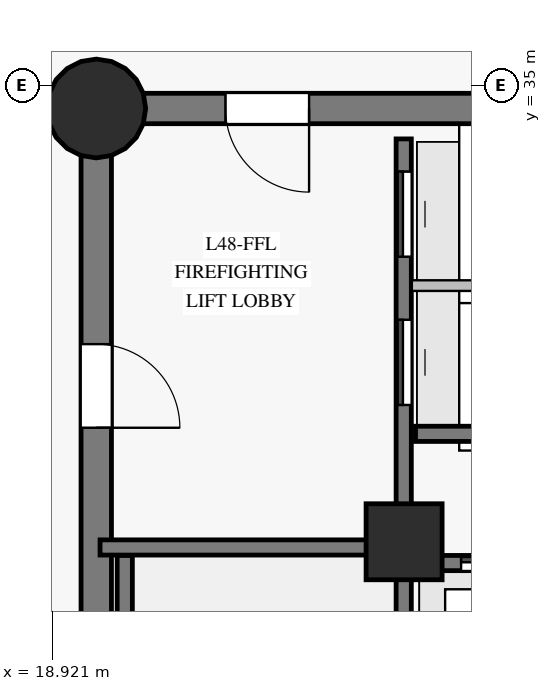
"""IFC4 building model, lengths in metres.
Left out: names, types, materials, properties, quantities, classifications, styles, units other than length and angle.
Written with IfcOpenShell. Run it as: python <this file> out.ifc"""

import sys

from ifc_helpers import new_model, si_unit, direction, frame, frame_2d, origin, origin_with_axes, origin_2d, place, context, subcontext, project, spatial, rectangle, circle, extrude, source, transform, mapped, element, fill, save


model = new_model("IFC4")
c1 = context("Model", 3, precision=1e-05, world=origin(), true_north=direction((0.0, 1.0)))
c2 = subcontext(c1, "Body", "Model", "MODEL_VIEW")
j1 = project(units=[si_unit("LENGTHUNIT", "METRE"), si_unit("PLANEANGLEUNIT", "RADIAN")], contexts=[c1])
p1 = place(None, origin())
s1 = spatial("IfcSite", under=j1, at=p1, CompositionType="ELEMENT")
p2 = place(p1, origin())
s2 = spatial("IfcBuilding", under=s1, at=p2, CompositionType="ELEMENT")
p3 = place(p2, frame((0.0, 0.0, 168.75)))
s3 = spatial("IfcBuildingStorey", under=s2, at=p3, CompositionType="ELEMENT", Elevation=168.75)
p4 = place(p3, frame((26.55, 34.7, 0.0), z_axis=(0.0, 0.0, 1.0), x_axis=(-1.0, 0.0, 0.0)))
e1 = element("IfcWall", 1, at=p4, inside=s3, PredefinedType="SHEAR", context=c2, shape_type="SweptSolid", body=[
    extrude(rectangle(XDim=7.05, YDim=0.4, at=frame_2d((3.525, 0.0))), origin(), (0.0, 0.0, 1.0), 2.825),
])
p5 = place(p4, frame((4.25, 0.0, 0.0)))
e2 = element("IfcOpeningElement", 2, at=p5, cuts=e1, PredefinedType="OPENING", context=c2, shape_type="SweptSolid", body=[
    extrude(rectangle(XDim=1.1, YDim=2.15, at=frame_2d((0.55, 1.075))), frame((0.0, 0.21, 0.0), z_axis=(0.0, -1.0, 0.0), x_axis=(1.0, 0.0, 0.0)), (0.0, 0.0, 1.0), 0.42),
])
p6 = place(p3, frame((19.5, 34.7, 0.0), z_axis=(0.0, 0.0, 1.0), x_axis=(0.0, -1.0, 0.0)))
e3 = element("IfcWall", 3, at=p6, inside=s3, PredefinedType="SHEAR", context=c2, shape_type="SweptSolid", body=[
    extrude(rectangle(XDim=16.4, YDim=0.4, at=frame_2d((8.2, 0.0))), origin(), (0.0, 0.0, 1.0), 2.825),
])
p7 = place(p6, frame((3.1, 0.0, 0.0)))
e4 = element("IfcOpeningElement", 4, at=p7, cuts=e3, PredefinedType="OPENING", context=c2, shape_type="SweptSolid", body=[
    extrude(rectangle(XDim=1.1, YDim=2.15, at=frame_2d((0.55, 1.075))), frame((0.0, 0.21, 0.0), z_axis=(0.0, -1.0, 0.0), x_axis=(1.0, 0.0, 0.0)), (0.0, 0.0, 1.0), 0.42),
])
m1 = source(origin_with_axes(), c2, "Body", "SweptSolid", [
    extrude(circle(Radius=0.65, at=origin_2d()), origin(), (0.0, 0.0, 1.0), 3.05),
])
p8 = place(p3, frame((19.5, 34.7, 0.0), z_axis=(0.0, 0.0, 1.0), x_axis=(1.0, 0.0, 0.0)))
e5 = element("IfcColumn", 5, at=p8, inside=s3, PredefinedType="COLUMN", context=c2, shape_type="MappedRepresentation", body=[
    mapped(m1, transform((0.0, 0.0, 0.0), scale=1.0)),
])
m2 = source(origin_with_axes(), c2, "Body", "SweptSolid", [
    extrude(rectangle(XDim=1.0, YDim=1.0, at=origin_2d()), origin(), (0.0, 0.0, 1.0), 3.05),
])
p9 = place(p3, frame((23.55, 29.0, 0.0), z_axis=(0.0, 0.0, 1.0), x_axis=(1.0, 0.0, 0.0)))
e6 = element("IfcColumn", 6, at=p9, inside=s3, PredefinedType="COLUMN", context=c2, shape_type="MappedRepresentation", body=[
    mapped(m2, transform((0.0, 0.0, 0.0), scale=1.0)),
])
p10 = place(p3, frame((23.545, 18.7, 0.0), z_axis=(0.0, 0.0, 1.0), x_axis=(0.0, 1.0, 0.0)))
e7 = element("IfcWall", 7, at=p10, inside=s3, PredefinedType="SHEAR", context=c2, shape_type="SweptSolid", body=[
    extrude(rectangle(XDim=15.6, YDim=0.2, at=frame_2d((7.8, 0.0))), origin(), (0.0, 0.0, 1.0), 2.825),
])
p11 = place(p10, frame((2.75, 0.0, 0.0)))
e8 = element("IfcOpeningElement", 8, at=p11, cuts=e7, PredefinedType="OPENING", context=c2, shape_type="SweptSolid", body=[
    extrude(rectangle(XDim=1.15, YDim=2.15, at=frame_2d((0.575, 1.075))), frame((0.0, 0.11, 0.0), z_axis=(0.0, -1.0, 0.0), x_axis=(1.0, 0.0, 0.0)), (0.0, 0.0, 1.0), 0.22),
])
p12 = place(p10, frame((0.14, 0.0, 0.0)))
e9 = element("IfcOpeningElement", 9, at=p12, cuts=e7, PredefinedType="OPENING", context=c2, shape_type="SweptSolid", body=[
    extrude(rectangle(XDim=0.88, YDim=2.1, at=frame_2d((0.44, 1.05))), frame((0.0, 0.11, 0.0), z_axis=(0.0, -1.0, 0.0), x_axis=(1.0, 0.0, 0.0)), (0.0, 0.0, 1.0), 0.22),
])
p13 = place(p10, frame((1.36, 0.0, 0.0)))
e10 = element("IfcOpeningElement", 10, at=p13, cuts=e7, PredefinedType="OPENING", context=c2, shape_type="SweptSolid", body=[
    extrude(rectangle(XDim=0.88, YDim=2.1, at=frame_2d((0.44, 1.05))), frame((0.0, 0.11, 0.0), z_axis=(0.0, -1.0, 0.0), x_axis=(1.0, 0.0, 0.0)), (0.0, 0.0, 1.0), 0.22),
])
p14 = place(p10, frame((12.1, 0.0, 0.0)))
e11 = element("IfcOpeningElement", 11, at=p14, cuts=e7, PredefinedType="OPENING", context=c2, shape_type="SweptSolid", body=[
    extrude(rectangle(XDim=1.12, YDim=2.15, at=frame_2d((0.56, 1.075))), frame((0.0, 0.11, 0.0), z_axis=(0.0, -1.0, 0.0), x_axis=(1.0, 0.0, 0.0)), (0.0, 0.0, 1.0), 0.22),
])
p15 = place(p10, frame((14.05, 0.0, 0.0)))
e12 = element("IfcOpeningElement", 12, at=p15, cuts=e7, PredefinedType="OPENING", context=c2, shape_type="SweptSolid", body=[
    extrude(rectangle(XDim=1.12, YDim=2.15, at=frame_2d((0.56, 1.075))), frame((0.0, 0.11, 0.0), z_axis=(0.0, -1.0, 0.0), x_axis=(1.0, 0.0, 0.0)), (0.0, 0.0, 1.0), 0.22),
])
p16 = place(p3, frame((23.7, 28.72, 0.0), z_axis=(0.0, 0.0, 1.0), x_axis=(1.0, 0.0, 0.0)))
e13 = element("IfcWall", 13, at=p16, inside=s3, PredefinedType="SHEAR", context=c2, shape_type="SweptSolid", body=[
    extrude(rectangle(XDim=9.6, YDim=0.2, at=frame_2d((4.8, 0.0))), origin(), (0.0, 0.0, 1.0), 2.825),
])
p17 = place(p16, frame((0.6, 0.0, 0.0)))
e14 = element("IfcOpeningElement", 14, at=p17, cuts=e13, PredefinedType="OPENING", context=c2, shape_type="SweptSolid", body=[
    extrude(rectangle(XDim=1.1, YDim=2.15, at=frame_2d((0.55, 1.075))), frame((0.0, 0.11, 0.0), z_axis=(0.0, -1.0, 0.0), x_axis=(1.0, 0.0, 0.0)), (0.0, 0.0, 1.0), 0.22),
])
p18 = place(p16, frame((2.98, 0.0, 0.0)))
e15 = element("IfcOpeningElement", 15, at=p18, cuts=e13, PredefinedType="OPENING", context=c2, shape_type="SweptSolid", body=[
    extrude(rectangle(XDim=1.1, YDim=2.15, at=frame_2d((0.55, 1.075))), frame((0.0, 0.11, 0.0), z_axis=(0.0, -1.0, 0.0), x_axis=(1.0, 0.0, 0.0)), (0.0, 0.0, 1.0), 0.22),
])
p19 = place(p16, frame((5.36, 0.0, 0.0)))
e16 = element("IfcOpeningElement", 16, at=p19, cuts=e13, PredefinedType="OPENING", context=c2, shape_type="SweptSolid", body=[
    extrude(rectangle(XDim=1.1, YDim=2.15, at=frame_2d((0.55, 1.075))), frame((0.0, 0.11, 0.0), z_axis=(0.0, -1.0, 0.0), x_axis=(1.0, 0.0, 0.0)), (0.0, 0.0, 1.0), 0.22),
])
p20 = place(p16, frame((7.74, 0.0, 0.0)))
e17 = element("IfcOpeningElement", 17, at=p20, cuts=e13, PredefinedType="OPENING", context=c2, shape_type="SweptSolid", body=[
    extrude(rectangle(XDim=1.1, YDim=2.15, at=frame_2d((0.55, 1.075))), frame((0.0, 0.11, 0.0), z_axis=(0.0, -1.0, 0.0), x_axis=(1.0, 0.0, 0.0)), (0.0, 0.0, 1.0), 0.22),
])
p21 = place(p3, frame((19.875, 21.32, 0.0), z_axis=(0.0, 0.0, 1.0), x_axis=(0.0, 1.0, 0.0)))
e18 = element("IfcWall", 18, at=p21, inside=s3, PredefinedType="SHEAR", context=c2, shape_type="SweptSolid", body=[
    extrude(rectangle(XDim=7.5, YDim=0.2, at=frame_2d((3.75, 0.0))), origin(), (0.0, 0.0, 1.0), 2.825),
])
p22 = place(p3, frame((19.55, 28.925, 0.0), z_axis=(0.0, 0.0, 1.0), x_axis=(1.0, 0.0, 0.0)))
e19 = element("IfcWall", 19, at=p22, inside=s3, PredefinedType="SHEAR", context=c2, shape_type="SweptSolid", body=[
    extrude(rectangle(XDim=3.995, YDim=0.2, at=frame_2d((1.998, 0.0))), origin(), (0.0, 0.0, 1.0), 2.825),
])
p23 = place(p3, frame((23.7, 30.42, 0.0), z_axis=(0.0, 0.0, 1.0), x_axis=(1.0, 0.0, 0.0)))
e20 = element("IfcWall", 20, at=p23, inside=s3, PredefinedType="SHEAR", context=c2, shape_type="SweptSolid", body=[
    extrude(rectangle(XDim=2.78, YDim=0.2, at=frame_2d((1.39, 0.0))), origin(), (0.0, 0.0, 1.0), 2.825),
])
p24 = place(p3, frame((23.652, 32.37, 0.0), z_axis=(0.0, 0.0, 1.0), x_axis=(1.0, 0.0, 0.0)))
e21 = element("IfcWall", 21, at=p24, inside=s3, PredefinedType="PARTITIONING", context=c2, shape_type="SweptSolid", body=[
    extrude(rectangle(XDim=2.828, YDim=0.14, at=frame_2d((1.414, 0.0))), origin(), (0.0, 0.0, 1.0), 2.825),
])
m3 = source(origin_with_axes(), c2, "Body", "SweptSolid", [
    extrude(rectangle(XDim=1.1, YDim=2.15, at=frame_2d((0.55, 1.075))), frame((0.0, 0.025, 0.0), z_axis=(0.0, -1.0, 0.0), x_axis=(1.0, 0.0, 0.0)), (0.0, 0.0, 1.0), 0.05),
])
p25 = place(p5, origin())
e22 = element("IfcDoor", 22, at=p25, inside=s3, OperationType="SINGLE_SWING_LEFT", PredefinedType="DOOR", context=c2, shape_type="MappedRepresentation", body=[
    mapped(m3, transform((0.0, 0.0, 0.0), scale=1.0)),
])
fill(e2, e22)
p26 = place(p7, origin())
e23 = element("IfcDoor", 23, at=p26, inside=s3, OperationType="SINGLE_SWING_RIGHT", PredefinedType="DOOR", context=c2, shape_type="MappedRepresentation", body=[
    mapped(m3, transform((0.0, 0.0, 0.0), scale=1.0)),
])
fill(e4, e23)
p27 = place(p17, origin())
e24 = element("IfcDoor", 24, at=p27, inside=s3, OperationType="SLIDING_TO_LEFT", PredefinedType="DOOR", context=c2, shape_type="MappedRepresentation", body=[
    mapped(m3, transform((0.0, 0.0, 0.0), scale=1.0)),
])
fill(e14, e24)
m4 = source(origin_with_axes(), c2, "Body", "SweptSolid", [
    extrude(rectangle(XDim=1.12, YDim=2.15, at=frame_2d((0.56, 1.075))), frame((0.0, 0.025, 0.0), z_axis=(0.0, -1.0, 0.0), x_axis=(1.0, 0.0, 0.0)), (0.0, 0.0, 1.0), 0.05),
])
p28 = place(p14, origin())
e25 = element("IfcDoor", 25, at=p28, inside=s3, OperationType="SLIDING_TO_LEFT", PredefinedType="DOOR", context=c2, shape_type="MappedRepresentation", body=[
    mapped(m4, transform((0.0, 0.0, 0.0), scale=1.0)),
])
fill(e11, e25)
p29 = place(p15, origin())
e26 = element("IfcDoor", 26, at=p29, inside=s3, OperationType="SLIDING_TO_RIGHT", PredefinedType="DOOR", context=c2, shape_type="MappedRepresentation", body=[
    mapped(m4, transform((0.0, 0.0, 0.0), scale=1.0)),
])
fill(e12, e26)
save(model, sys.argv[1])
